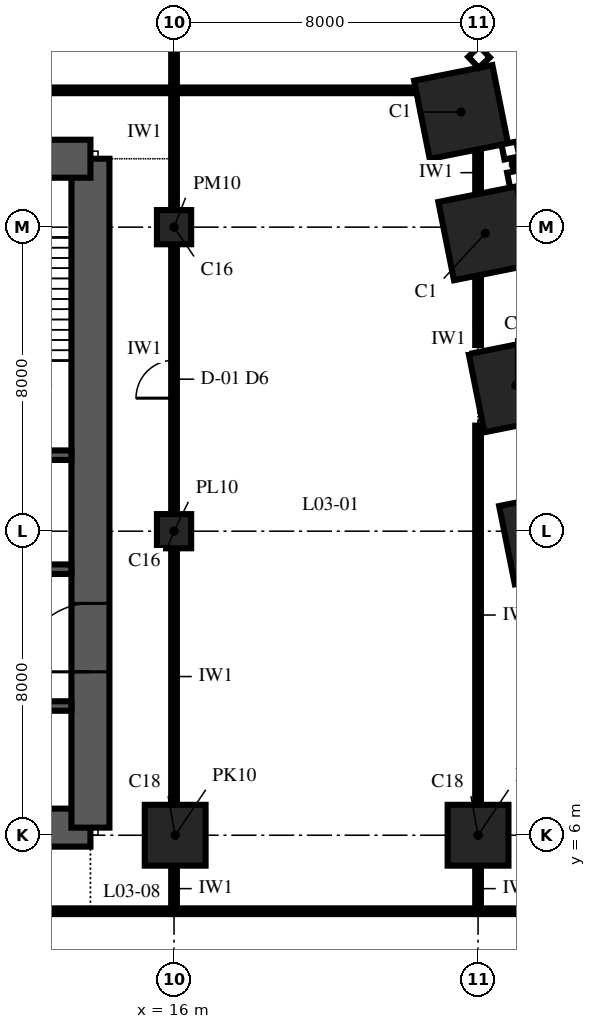
"""IFC4 building model, lengths in metres.
Left out: names, types, materials, properties, quantities, classifications, styles, units other than length and angle.
Written with IfcOpenShell. Run it as: python <this file> out.ifc"""

import sys

from ifc_helpers import new_model, si_unit, direction, frame, frame_2d, origin, origin_2d, place, context, subcontext, project, spatial, polyline, rectangle, outline, extrude, element, fill, save


model = new_model("IFC4")
c1 = context("Model", 3, precision=1e-05, world=origin(), true_north=direction((0.0, 1.0)))
c2 = subcontext(c1, "Body", "Model", "MODEL_VIEW")
j1 = project(units=[si_unit("LENGTHUNIT", "METRE"), si_unit("PLANEANGLEUNIT", "RADIAN")], contexts=[c1])
p1 = place(None, origin())
s1 = spatial("IfcSite", under=j1, at=p1, CompositionType="ELEMENT")
p2 = place(p1, origin())
s2 = spatial("IfcBuilding", under=s1, at=p2, CompositionType="ELEMENT")
p3 = place(p2, frame((0.0, 0.0, 19.0)))
s3 = spatial("IfcBuildingStorey", under=s2, at=p3, CompositionType="ELEMENT", Elevation=19.0)
for number, where, z_axis, x_axis in (
    (1, (25.791, 13.838, 0.0), (0.0, 0.0, 1.0), (-0.196, 0.981, 0.0)),
    (2, (24.991, 17.838, 0.0), (0.0, 0.0, 1.0), (-0.196, 0.981, 0.0)),
    (3, (24.191, 21.838, 0.0), (0.0, 0.0, 1.0), (-0.196, 0.981, 0.0)),
    (4, (23.553, 25.029, 0.0), (0.0, 0.0, 1.0), (-0.196, 0.981, 0.0)),
):
    element("IfcColumn", number, at=place(p3, frame(where, z_axis=z_axis, x_axis=x_axis)), inside=s3, PredefinedType="COLUMN", context=c2, shape_type="SweptSolid", body=[
        extrude(rectangle(XDim=2.1, YDim=2.1, at=origin_2d()), origin(), (0.0, 0.0, 1.0), 9.0),
    ])
p4 = place(p3, frame((16.03, 6.0, 0.0), z_axis=(0.0, 0.0, 1.0), x_axis=(1.0, 0.0, 0.0)))
e5 = element("IfcColumn", 5, at=p4, inside=s3, PredefinedType="COLUMN", context=c2, shape_type="SweptSolid", body=[
    extrude(rectangle(XDim=1.6, YDim=1.6, at=origin_2d()), origin(), (0.0, 0.0, 1.0), 9.0),
])
for number, where, z_axis, x_axis in (
    (6, (16.0, 14.0, 0.0), (0.0, 0.0, 1.0), (1.0, 0.0, 0.0)),
    (7, (16.0, 22.0, 0.0), (0.0, 0.0, 1.0), (1.0, 0.0, 0.0)),
):
    element("IfcColumn", number, at=place(p3, frame(where, z_axis=z_axis, x_axis=x_axis)), inside=s3, PredefinedType="COLUMN", context=c2, shape_type="SweptSolid", body=[
        extrude(rectangle(XDim=0.9, YDim=0.9, at=origin_2d()), origin(), (0.0, 0.0, 1.0), 9.0),
    ])
p5 = place(p3, frame((24.0, 6.0, 0.0), z_axis=(0.0, 0.0, 1.0), x_axis=(1.0, 0.0, 0.0)))
e8 = element("IfcColumn", 8, at=p5, inside=s3, PredefinedType="COLUMN", context=c2, shape_type="SweptSolid", body=[
    extrude(rectangle(XDim=1.6, YDim=1.6, at=origin_2d()), origin(), (0.0, 0.0, 1.0), 9.0),
])
p6 = place(p3, frame((-13.8, 6.2, 0.0), z_axis=(0.0, 0.0, 1.0), x_axis=(1.0, 0.0, 0.0)))
e9 = element("IfcWall", 9, at=p6, inside=s3, PredefinedType="SHEAR", context=c2, shape_type="SweptSolid", body=[
    extrude(rectangle(XDim=27.6, YDim=1.0, at=frame_2d((13.8, 0.0))), origin(), (0.0, 0.0, 1.0), 9.0),
])
p7 = place(p3, frame((13.8, 6.2, 0.0), z_axis=(0.0, 0.0, 1.0), x_axis=(0.0, 1.0, 0.0)))
e10 = element("IfcWall", 10, at=p7, inside=s3, PredefinedType="SHEAR", context=c2, shape_type="SweptSolid", body=[
    extrude(outline(polyline([(0.0, -0.5), (17.6, -0.5), (17.6, 0.0), (17.1, 0.0), (17.1, 0.5), (0.5, 0.5), (0.5, 0.0), (0.0, 0.0), (0.0, -0.5)])), origin(), (0.0, 0.0, 1.0), 9.0),
])
p8 = place(p7, frame((4.1, 0.0, 0.0)))
e11 = element("IfcOpeningElement", 11, at=p8, cuts=e10, PredefinedType="OPENING", context=c2, shape_type="SweptSolid", body=[
    extrude(rectangle(XDim=1.8, YDim=2.4, at=frame_2d((0.9, 1.2))), frame((0.0, 0.515, 0.0), z_axis=(0.0, -1.0, 0.0), x_axis=(1.0, 0.0, 0.0)), (0.0, 0.0, 1.0), 1.03),
])
p9 = place(p3, frame((13.8, 23.8, 0.0), z_axis=(0.0, 0.0, 1.0), x_axis=(-1.0, 0.0, 0.0)))
e12 = element("IfcWall", 12, at=p9, inside=s3, PredefinedType="SHEAR", context=c2, shape_type="SweptSolid", body=[
    extrude(rectangle(XDim=27.6, YDim=1.0, at=frame_2d((13.8, 0.0))), origin(), (0.0, 0.0, 1.0), 9.0),
])
p10 = place(p9, frame((21.7, 0.0, 0.0)))
e13 = element("IfcOpeningElement", 13, at=p10, cuts=e12, PredefinedType="OPENING", context=c2, shape_type="SweptSolid", body=[
    extrude(rectangle(XDim=1.0, YDim=2.1, at=frame_2d((0.5, 1.05))), frame((0.0, 0.515, 0.0), z_axis=(0.0, -1.0, 0.0), x_axis=(1.0, 0.0, 0.0)), (0.0, 0.0, 1.0), 1.03),
])
p11 = place(p9, frame((4.9, 0.0, 0.0)))
e14 = element("IfcOpeningElement", 14, at=p11, cuts=e12, PredefinedType="OPENING", context=c2, shape_type="SweptSolid", body=[
    extrude(rectangle(XDim=1.0, YDim=2.1, at=frame_2d((0.5, 1.05))), frame((0.0, 0.515, 0.0), z_axis=(0.0, -1.0, 0.0), x_axis=(1.0, 0.0, 0.0)), (0.0, 0.0, 1.0), 1.03),
])
p12 = place(p9, frame((17.3, 0.0, 0.0)))
e15 = element("IfcOpeningElement", 15, at=p12, cuts=e12, PredefinedType="OPENING", context=c2, shape_type="SweptSolid", body=[
    extrude(rectangle(XDim=1.0, YDim=2.1, at=frame_2d((0.5, 1.05))), frame((0.0, 0.515, 0.0), z_axis=(0.0, -1.0, 0.0), x_axis=(1.0, 0.0, 0.0)), (0.0, 0.0, 1.0), 1.03),
])
p13 = place(p9, frame((13.3, 0.0, 0.0)))
e16 = element("IfcOpeningElement", 16, at=p13, cuts=e12, PredefinedType="OPENING", context=c2, shape_type="SweptSolid", body=[
    extrude(rectangle(XDim=1.0, YDim=2.1, at=frame_2d((0.5, 1.05))), frame((0.0, 0.515, 0.0), z_axis=(0.0, -1.0, 0.0), x_axis=(1.0, 0.0, 0.0)), (0.0, 0.0, 1.0), 1.03),
])
p14 = place(p9, frame((9.3, 0.0, 0.0)))
e17 = element("IfcOpeningElement", 17, at=p14, cuts=e12, PredefinedType="OPENING", context=c2, shape_type="SweptSolid", body=[
    extrude(rectangle(XDim=1.0, YDim=2.1, at=frame_2d((0.5, 1.05))), frame((0.0, 0.515, 0.0), z_axis=(0.0, -1.0, 0.0), x_axis=(1.0, 0.0, 0.0)), (0.0, 0.0, 1.0), 1.03),
])
p15 = place(p3, frame((-13.3, 9.4, 0.0), z_axis=(0.0, 0.0, 1.0), x_axis=(1.0, 0.0, 0.0)))
e18 = element("IfcWall", 18, at=p15, inside=s3, PredefinedType="SHEAR", context=c2, shape_type="SweptSolid", body=[
    extrude(rectangle(XDim=26.6, YDim=0.25, at=frame_2d((13.3, 0.0))), origin(), (0.0, 0.0, 1.0), 9.0),
])
p16 = place(p3, frame((-13.3, 13.0, 0.0), z_axis=(0.0, 0.0, 1.0), x_axis=(1.0, 0.0, 0.0)))
e19 = element("IfcWall", 19, at=p16, inside=s3, PredefinedType="SHEAR", context=c2, shape_type="SweptSolid", body=[
    extrude(rectangle(XDim=26.6, YDim=0.25, at=frame_2d((13.3, 0.0))), origin(), (0.0, 0.0, 1.0), 9.0),
])
p17 = place(p16, frame((16.45, 0.0, 0.0)))
e20 = element("IfcOpeningElement", 20, at=p17, cuts=e19, PredefinedType="OPENING", context=c2, shape_type="SweptSolid", body=[
    extrude(rectangle(XDim=0.9, YDim=2.1, at=frame_2d((0.45, 1.05))), frame((0.0, 0.14, 0.0), z_axis=(0.0, -1.0, 0.0), x_axis=(1.0, 0.0, 0.0)), (0.0, 0.0, 1.0), 0.28),
])
p18 = place(p16, frame((20.05, 0.0, 0.0)))
e21 = element("IfcOpeningElement", 21, at=p18, cuts=e19, PredefinedType="OPENING", context=c2, shape_type="SweptSolid", body=[
    extrude(rectangle(XDim=0.9, YDim=2.1, at=frame_2d((0.45, 1.05))), frame((0.0, 0.14, 0.0), z_axis=(0.0, -1.0, 0.0), x_axis=(1.0, 0.0, 0.0)), (0.0, 0.0, 1.0), 0.28),
])
p19 = place(p16, frame((22.05, 0.0, 0.0)))
e22 = element("IfcOpeningElement", 22, at=p19, cuts=e19, PredefinedType="OPENING", context=c2, shape_type="SweptSolid", body=[
    extrude(rectangle(XDim=0.9, YDim=2.1, at=frame_2d((0.45, 1.05))), frame((0.0, 0.14, 0.0), z_axis=(0.0, -1.0, 0.0), x_axis=(1.0, 0.0, 0.0)), (0.0, 0.0, 1.0), 0.28),
])
p20 = place(p3, frame((-13.3, 16.0, 0.0), z_axis=(0.0, 0.0, 1.0), x_axis=(1.0, 0.0, 0.0)))
e23 = element("IfcWall", 23, at=p20, inside=s3, PredefinedType="SHEAR", context=c2, shape_type="SweptSolid", body=[
    extrude(rectangle(XDim=26.6, YDim=0.25, at=frame_2d((13.3, 0.0))), origin(), (0.0, 0.0, 1.0), 9.0),
])
p21 = place(p3, frame((16.0, 4.0, 0.0), z_axis=(0.0, 0.0, 1.0), x_axis=(0.0, 1.0, 0.0)))
e24 = element("IfcWall", 24, at=p21, inside=s3, PredefinedType="PARTITIONING", context=c2, shape_type="SweptSolid", body=[
    extrude(rectangle(XDim=1.19, YDim=0.15, at=frame_2d((0.595, 0.0))), origin(), (0.0, 0.0, 1.0), 8.75),
])
p22 = place(p3, frame((16.0, 6.81, 0.0), z_axis=(0.0, 0.0, 1.0), x_axis=(0.0, 1.0, 0.0)))
e25 = element("IfcWall", 25, at=p22, inside=s3, PredefinedType="PARTITIONING", context=c2, shape_type="SweptSolid", body=[
    extrude(rectangle(XDim=6.73, YDim=0.15, at=frame_2d((3.365, 0.0))), origin(), (0.0, 0.0, 1.0), 8.75),
])
p23 = place(p3, frame((16.0, 14.46, 0.0), z_axis=(0.0, 0.0, 1.0), x_axis=(0.0, 1.0, 0.0)))
e26 = element("IfcWall", 26, at=p23, inside=s3, PredefinedType="PARTITIONING", context=c2, shape_type="SweptSolid", body=[
    extrude(rectangle(XDim=7.08, YDim=0.15, at=frame_2d((3.54, 0.0))), origin(), (0.0, 0.0, 1.0), 8.75),
])
p24 = place(p23, frame((3.04, 0.0, 0.0)))
e27 = element("IfcOpeningElement", 27, at=p24, cuts=e26, PredefinedType="OPENING", context=c2, shape_type="SweptSolid", body=[
    extrude(rectangle(XDim=1.0, YDim=2.1, at=frame_2d((0.5, 1.05))), frame((0.0, 0.09, 0.0), z_axis=(0.0, -1.0, 0.0), x_axis=(1.0, 0.0, 0.0)), (0.0, 0.0, 1.0), 0.18),
])
p25 = place(p3, frame((16.0, 22.46, 0.0), z_axis=(0.0, 0.0, 1.0), x_axis=(0.0, 1.0, 0.0)))
e28 = element("IfcWall", 28, at=p25, inside=s3, PredefinedType="PARTITIONING", context=c2, shape_type="SweptSolid", body=[
    extrude(rectangle(XDim=5.655, YDim=0.15, at=frame_2d((2.828, 0.0))), origin(), (0.0, 0.0, 1.0), 8.317),
])
p26 = place(p3, frame((24.0, 4.0, 0.0), z_axis=(0.0, 0.0, 1.0), x_axis=(0.0, 1.0, 0.0)))
e29 = element("IfcWall", 29, at=p26, inside=s3, PredefinedType="PARTITIONING", context=c2, shape_type="SweptSolid", body=[
    extrude(rectangle(XDim=1.19, YDim=0.15, at=frame_2d((0.595, 0.0))), origin(), (0.0, 0.0, 1.0), 8.75),
])
p27 = place(p3, frame((24.0, 6.81, 0.0), z_axis=(0.0, 0.0, 1.0), x_axis=(0.0, 1.0, 0.0)))
e30 = element("IfcWall", 30, at=p27, inside=s3, PredefinedType="PARTITIONING", context=c2, shape_type="SweptSolid", body=[
    extrude(rectangle(XDim=9.968, YDim=0.15, at=frame_2d((4.984, 0.0))), origin(), (0.0, 0.0, 1.0), 8.75),
])
p28 = place(p3, frame((24.0, 18.898, 0.0), z_axis=(0.0, 0.0, 1.0), x_axis=(0.0, 1.0, 0.0)))
e31 = element("IfcWall", 31, at=p28, inside=s3, PredefinedType="PARTITIONING", context=c2, shape_type="SweptSolid", body=[
    extrude(rectangle(XDim=1.88, YDim=0.15, at=frame_2d((0.94, 0.0))), origin(), (0.0, 0.0, 1.0), 7.1),
])
p29 = place(p3, frame((24.0, 22.898, 0.0), z_axis=(0.0, 0.0, 1.0), x_axis=(0.0, 1.0, 0.0)))
e32 = element("IfcWall", 32, at=p29, inside=s3, PredefinedType="PARTITIONING", context=c2, shape_type="SweptSolid", body=[
    extrude(rectangle(XDim=1.071, YDim=0.15, at=frame_2d((0.536, 0.0))), origin(), (0.0, 0.0, 1.0), 7.1),
])
p30 = place(p3, frame((-26.0, 4.0, 0.0), z_axis=(0.0, 0.0, 1.0), x_axis=(1.0, 0.0, 0.0)))
e33 = element("IfcWall", 33, at=p30, inside=s3, PredefinedType="PARTITIONING", context=c2, shape_type="SweptSolid", body=[
    extrude(rectangle(XDim=52.0, YDim=0.15, at=frame_2d((26.0, 0.0))), origin(), (0.0, 0.0, 1.0), 8.75),
])
p31 = place(p30, frame((25.5, 0.0, 0.0)))
e34 = element("IfcOpeningElement", 34, at=p31, cuts=e33, PredefinedType="OPENING", context=c2, shape_type="SweptSolid", body=[
    extrude(rectangle(XDim=1.0, YDim=2.1, at=frame_2d((0.5, 1.05))), frame((0.0, 0.09, 0.0), z_axis=(0.0, -1.0, 0.0), x_axis=(1.0, 0.0, 0.0)), (0.0, 0.0, 1.0), 0.18),
])
p32 = place(p3, frame((-22.493, 25.6, 0.0), z_axis=(0.0, 0.0, 1.0), x_axis=(1.0, 0.0, 0.0)))
e35 = element("IfcWall", 35, at=p32, inside=s3, PredefinedType="PARTITIONING", context=c2, shape_type="SweptSolid", body=[
    extrude(rectangle(XDim=44.986, YDim=0.15, at=frame_2d((22.493, 0.0))), origin(), (0.0, 0.0, 1.0), 8.75),
])
p33 = place(p32, frame((10.993, 0.0, 0.0)))
e36 = element("IfcOpeningElement", 36, at=p33, cuts=e35, PredefinedType="OPENING", context=c2, shape_type="SweptSolid", body=[
    extrude(rectangle(XDim=1.0, YDim=2.1, at=frame_2d((0.5, 1.05))), frame((0.0, 0.09, 0.0), z_axis=(0.0, -1.0, 0.0), x_axis=(1.0, 0.0, 0.0)), (0.0, 0.0, 1.0), 0.18),
])
p34 = place(p32, frame((20.993, 0.0, 0.0)))
e37 = element("IfcOpeningElement", 37, at=p34, cuts=e35, PredefinedType="OPENING", context=c2, shape_type="SweptSolid", body=[
    extrude(rectangle(XDim=1.0, YDim=2.1, at=frame_2d((0.5, 1.05))), frame((0.0, 0.09, 0.0), z_axis=(0.0, -1.0, 0.0), x_axis=(1.0, 0.0, 0.0)), (0.0, 0.0, 1.0), 0.18),
])
p35 = place(p32, frame((27.993, 0.0, 0.0)))
e38 = element("IfcOpeningElement", 38, at=p35, cuts=e35, PredefinedType="OPENING", context=c2, shape_type="SweptSolid", body=[
    extrude(rectangle(XDim=1.0, YDim=2.1, at=frame_2d((0.5, 1.05))), frame((0.0, 0.09, 0.0), z_axis=(0.0, -1.0, 0.0), x_axis=(1.0, 0.0, 0.0)), (0.0, 0.0, 1.0), 0.18),
])
p36 = place(p8, origin())
e39 = element("IfcDoor", 39, at=p36, inside=s3, OperationType="DOUBLE_DOOR_SINGLE_SWING", PredefinedType="DOOR", context=c2, shape_type="SweptSolid", body=[
    extrude(rectangle(XDim=1.8, YDim=2.4, at=frame_2d((0.9, 1.2))), frame((0.0, 0.5, 0.0), z_axis=(0.0, -1.0, 0.0), x_axis=(1.0, 0.0, 0.0)), (0.0, 0.0, 1.0), 1.0),
])
fill(e11, e39)
p37 = place(p24, origin())
e40 = element("IfcDoor", 40, at=p37, inside=s3, OperationType="SINGLE_SWING_LEFT", PredefinedType="DOOR", context=c2, shape_type="SweptSolid", body=[
    extrude(rectangle(XDim=1.0, YDim=2.1, at=frame_2d((0.5, 1.05))), frame((0.0, 0.075, 0.0), z_axis=(0.0, -1.0, 0.0), x_axis=(1.0, 0.0, 0.0)), (0.0, 0.0, 1.0), 0.149),
])
fill(e27, e40)
save(model, sys.argv[1])
